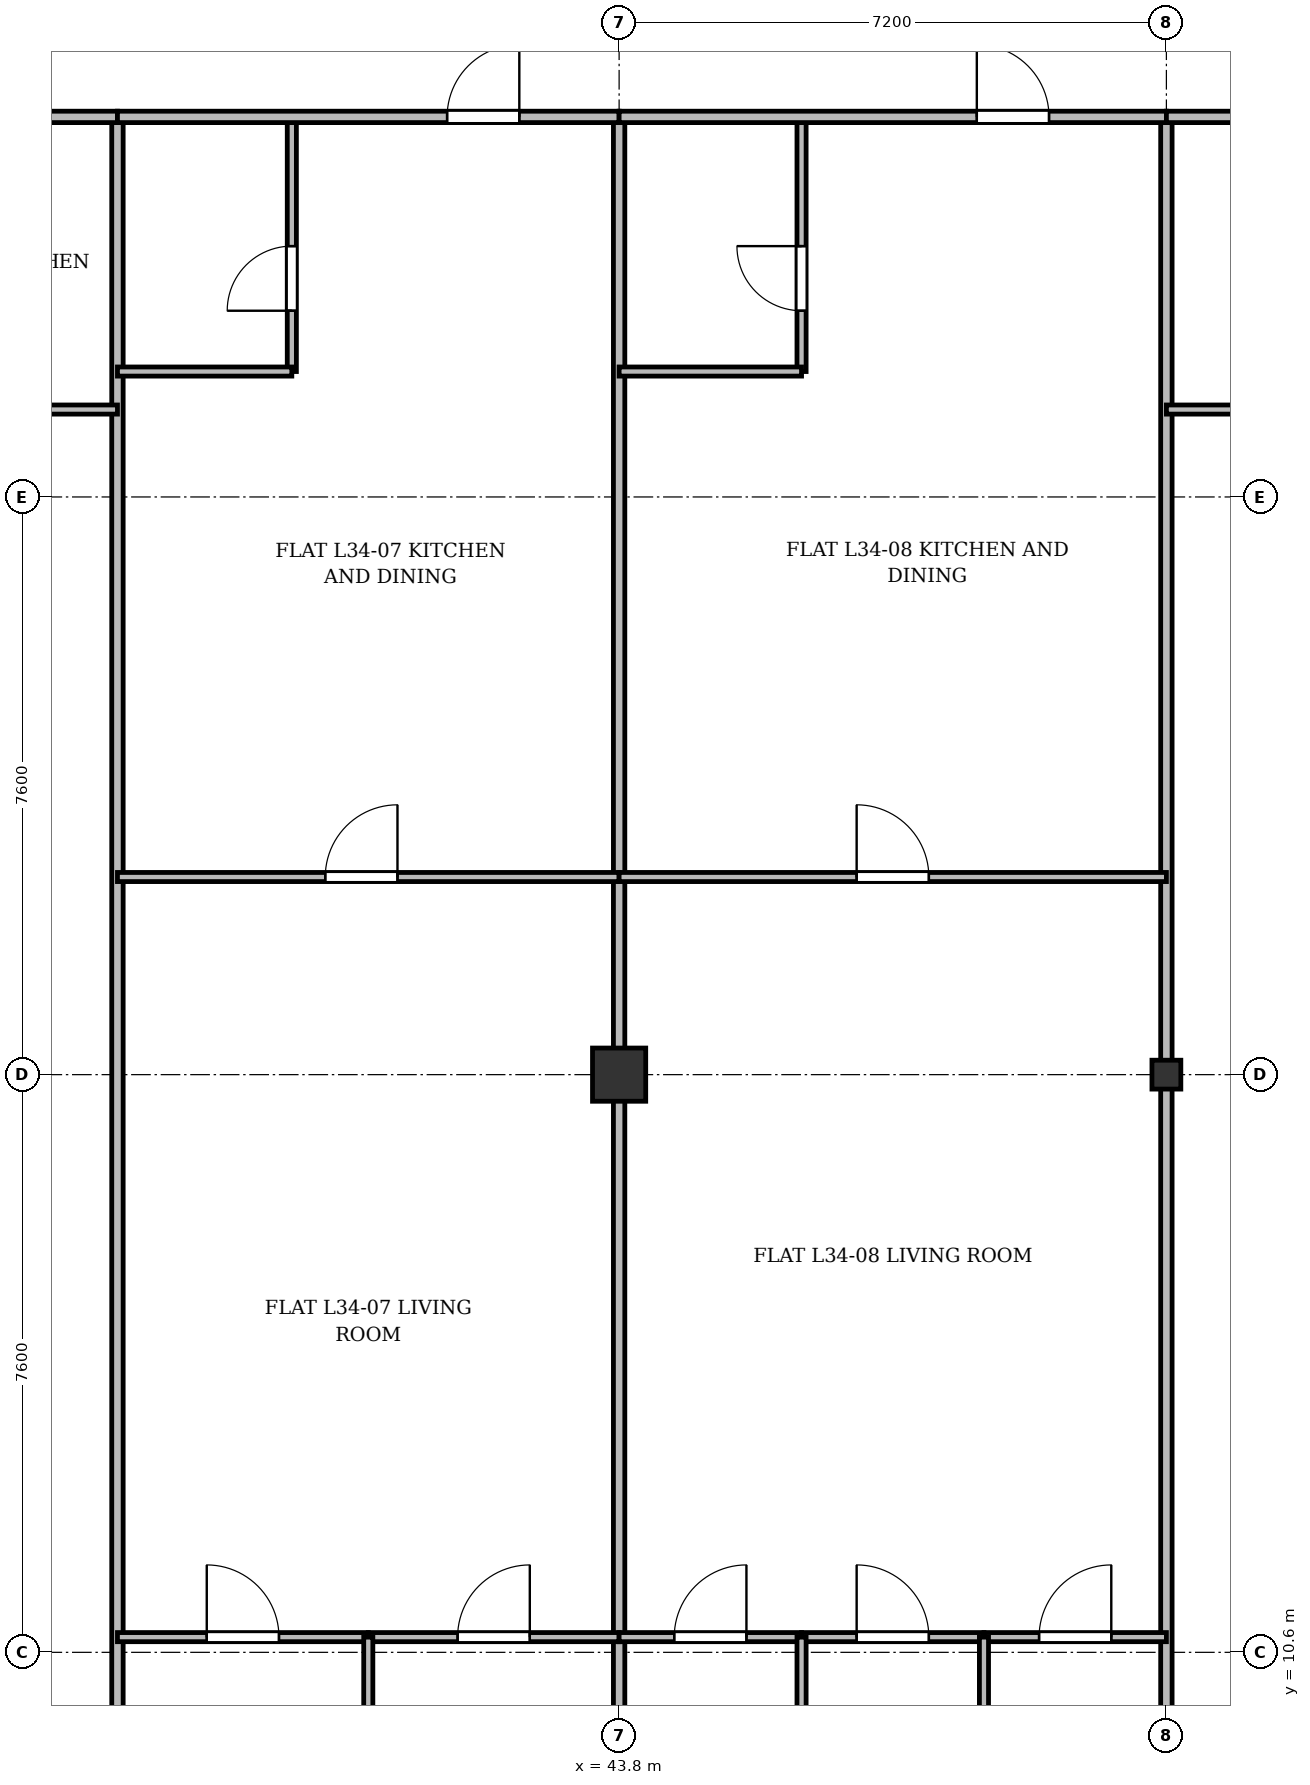
"""IFC4 building model, lengths in metres.
Left out: names, types, materials, properties, quantities, classifications, styles, units other than length and angle.
Written with IfcOpenShell. Run it as: python <this file> out.ifc"""

import sys

from ifc_helpers import new_model, si_unit, direction, frame, frame_2d, origin, origin_2d, place, context, subcontext, project, spatial, rectangle, i_section, extrude, source, transform, mapped, element, fill, save


model = new_model("IFC4")
c1 = context("Model", 3, precision=1e-05, world=origin(), true_north=direction((0.0, 1.0)))
c2 = subcontext(c1, "Body", "Model", "MODEL_VIEW")
j1 = project(units=[si_unit("LENGTHUNIT", "METRE"), si_unit("PLANEANGLEUNIT", "RADIAN")], contexts=[c1])
p1 = place(None, origin())
s1 = spatial("IfcSite", under=j1, at=p1, CompositionType="ELEMENT")
p2 = place(p1, origin())
s2 = spatial("IfcBuilding", under=s1, at=p2, CompositionType="ELEMENT")
p3 = place(p2, frame((0.0, 0.0, 132.1)))
s3 = spatial("IfcBuildingStorey", under=s2, at=p3, CompositionType="ELEMENT", Elevation=132.1)
m1 = source(origin(), c2, "Body", "SweptSolid", [
    extrude(rectangle(XDim=0.7, YDim=0.7, at=origin_2d()), origin(), (0.0, 0.0, 1.0), 3.6),
])
p4 = place(p3, frame((43.8, 18.2, 0.0), z_axis=(0.0, 0.0, 1.0), x_axis=(1.0, 0.0, 0.0)))
e1 = element("IfcColumn", 1, at=p4, inside=s3, PredefinedType="COLUMN", context=c2, shape_type="MappedRepresentation", body=[
    mapped(m1, transform((0.0, 0.0, 0.0), x_axis=(1.0, 0.0, 0.0), y_axis=(0.0, 1.0, 0.0), z_axis=(0.0, 0.0, 1.0), scale=1.0)),
])
m2 = source(origin(), c2, "Body", "SweptSolid", [
    extrude(i_section(OverallWidth=0.38, OverallDepth=0.38, WebThickness=0.02, FlangeThickness=0.03, at=origin_2d()), origin(), (0.0, 0.0, 1.0), 3.6),
])
p5 = place(p3, frame((51.0, 18.2, 0.0), z_axis=(0.0, 0.0, 1.0), x_axis=(1.0, 0.0, 0.0)))
e2 = element("IfcColumn", 2, at=p5, inside=s3, PredefinedType="COLUMN", context=c2, shape_type="MappedRepresentation", body=[
    mapped(m2, transform((0.0, 0.0, 0.0), x_axis=(1.0, 0.0, 0.0), y_axis=(0.0, 1.0, 0.0), z_axis=(0.0, 0.0, 1.0), scale=1.0)),
])
p6 = place(p3, frame((37.2, 3.525, 0.0), z_axis=(0.0, 0.0, 1.0), x_axis=(0.0, 1.0, 0.0)))
e3 = element("IfcWall", 3, at=p6, inside=s3, PredefinedType="PARTITIONING", context=c2, shape_type="SweptSolid", body=[
    extrude(rectangle(XDim=27.275, YDim=0.15, at=frame_2d((13.638, 0.0))), origin(), (0.0, 0.0, 1.0), 2.75),
])
for number, where, z_axis, x_axis in (
    (4, (43.8, 3.525, 0.0), (0.0, 0.0, 1.0), (0.0, 1.0, 0.0)),
    (5, (51.0, 3.525, 0.0), (0.0, 0.0, 1.0), (0.0, 1.0, 0.0)),
):
    element("IfcWall", number, at=place(p3, frame(where, z_axis=z_axis, x_axis=x_axis)), inside=s3, PredefinedType="PARTITIONING", context=c2, shape_type="SweptSolid", body=[
        extrude(rectangle(XDim=27.275, YDim=0.15, at=frame_2d((13.638, 0.0))), origin(), (0.0, 0.0, 1.0), 2.85),
    ])
p7 = place(p3, frame((30.6, 30.8, 0.0), z_axis=(0.0, 0.0, 1.0), x_axis=(1.0, 0.0, 0.0)))
e6 = element("IfcWall", 6, at=p7, inside=s3, PredefinedType="PARTITIONING", context=c2, shape_type="SweptSolid", body=[
    extrude(rectangle(XDim=6.6, YDim=0.15, at=frame_2d((3.3, 0.0))), origin(), (0.0, 0.0, 1.0), 2.85),
])
p8 = place(p7, frame((2.734, 0.0, 0.0)))
e7 = element("IfcOpeningElement", 7, at=p8, cuts=e6, PredefinedType="OPENING", context=c2, shape_type="SweptSolid", body=[
    extrude(rectangle(XDim=0.95, YDim=2.15, at=frame_2d((0.475, 1.075))), frame((0.0, 0.085, 0.0), z_axis=(0.0, -1.0, 0.0), x_axis=(1.0, 0.0, 0.0)), (0.0, 0.0, 1.0), 0.17),
])
p9 = place(p3, frame((30.6, 26.95, 0.0), z_axis=(0.0, 0.0, 1.0), x_axis=(1.0, 0.0, 0.0)))
e8 = element("IfcWall", 8, at=p9, inside=s3, PredefinedType="PARTITIONING", context=c2, shape_type="SweptSolid", body=[
    extrude(rectangle(XDim=6.6, YDim=0.12, at=frame_2d((3.3, 0.0))), origin(), (0.0, 0.0, 1.0), 2.85),
])
p10 = place(p9, frame((2.734, 0.0, 0.0)))
e9 = element("IfcOpeningElement", 9, at=p10, cuts=e8, PredefinedType="OPENING", context=c2, shape_type="SweptSolid", body=[
    extrude(rectangle(XDim=0.95, YDim=2.15, at=frame_2d((0.475, 1.075))), frame((0.0, 0.07, 0.0), z_axis=(0.0, -1.0, 0.0), x_axis=(1.0, 0.0, 0.0)), (0.0, 0.0, 1.0), 0.14),
])
p11 = place(p3, frame((37.2, 20.8, 0.0), z_axis=(0.0, 0.0, 1.0), x_axis=(1.0, 0.0, 0.0)))
e10 = element("IfcWall", 10, at=p11, inside=s3, PredefinedType="PARTITIONING", context=c2, shape_type="SweptSolid", body=[
    extrude(rectangle(XDim=6.6, YDim=0.12, at=frame_2d((3.3, 0.0))), origin(), (0.0, 0.0, 1.0), 2.85),
])
p12 = place(p11, frame((2.734, 0.0, 0.0)))
e11 = element("IfcOpeningElement", 11, at=p12, cuts=e10, PredefinedType="OPENING", context=c2, shape_type="SweptSolid", body=[
    extrude(rectangle(XDim=0.95, YDim=2.15, at=frame_2d((0.475, 1.075))), frame((0.0, 0.07, 0.0), z_axis=(0.0, -1.0, 0.0), x_axis=(1.0, 0.0, 0.0)), (0.0, 0.0, 1.0), 0.14),
])
p13 = place(p3, frame((39.494, 27.45, 0.0), z_axis=(0.0, 0.0, 1.0), x_axis=(0.0, 1.0, 0.0)))
e12 = element("IfcWall", 12, at=p13, inside=s3, PredefinedType="PARTITIONING", context=c2, shape_type="SweptSolid", body=[
    extrude(rectangle(XDim=3.35, YDim=0.12, at=frame_2d((1.675, 0.0))), origin(), (0.0, 0.0, 1.0), 3.35),
])
p14 = place(p13, frame((0.8, 0.0, 0.0)))
e13 = element("IfcOpeningElement", 13, at=p14, cuts=e12, PredefinedType="OPENING", context=c2, shape_type="SweptSolid", body=[
    extrude(rectangle(XDim=0.85, YDim=2.1, at=frame_2d((0.425, 1.05))), frame((0.0, 0.07, 0.0), z_axis=(0.0, -1.0, 0.0), x_axis=(1.0, 0.0, 0.0)), (0.0, 0.0, 1.0), 0.14),
])
p15 = place(p3, frame((37.2, 27.45, 0.0), z_axis=(0.0, 0.0, 1.0), x_axis=(1.0, 0.0, 0.0)))
e14 = element("IfcWall", 14, at=p15, inside=s3, PredefinedType="PARTITIONING", context=c2, shape_type="SweptSolid", body=[
    extrude(rectangle(XDim=2.294, YDim=0.12, at=frame_2d((1.147, 0.0))), origin(), (0.0, 0.0, 1.0), 3.35),
])
p16 = place(p3, frame((37.2, 30.8, 0.0), z_axis=(0.0, 0.0, 1.0), x_axis=(1.0, 0.0, 0.0)))
e15 = element("IfcWall", 15, at=p16, inside=s3, PredefinedType="PARTITIONING", context=c2, shape_type="SweptSolid", body=[
    extrude(rectangle(XDim=6.6, YDim=0.15, at=frame_2d((3.3, 0.0))), origin(), (0.0, 0.0, 1.0), 2.85),
])
p17 = place(p16, frame((4.337, 0.0, 0.0)))
e16 = element("IfcOpeningElement", 16, at=p17, cuts=e15, PredefinedType="OPENING", context=c2, shape_type="SweptSolid", body=[
    extrude(rectangle(XDim=0.95, YDim=2.15, at=frame_2d((0.475, 1.075))), frame((0.0, 0.085, 0.0), z_axis=(0.0, -1.0, 0.0), x_axis=(1.0, 0.0, 0.0)), (0.0, 0.0, 1.0), 0.17),
])
p18 = place(p3, frame((37.2, 10.8, 0.0), z_axis=(0.0, 0.0, 1.0), x_axis=(1.0, 0.0, 0.0)))
e17 = element("IfcWall", 17, at=p18, inside=s3, PredefinedType="PARTITIONING", context=c2, shape_type="SweptSolid", body=[
    extrude(rectangle(XDim=3.3, YDim=0.12, at=frame_2d((1.65, 0.0))), origin(), (0.0, 0.0, 1.0), 3.0),
])
p19 = place(p18, frame((1.175, 0.0, 0.0)))
e18 = element("IfcOpeningElement", 18, at=p19, cuts=e17, PredefinedType="OPENING", context=c2, shape_type="SweptSolid", body=[
    extrude(rectangle(XDim=0.95, YDim=2.15, at=frame_2d((0.475, 1.075))), frame((0.0, 0.07, 0.0), z_axis=(0.0, -1.0, 0.0), x_axis=(1.0, 0.0, 0.0)), (0.0, 0.0, 1.0), 0.14),
])
p20 = place(p3, frame((40.5, 10.8, 0.0), z_axis=(0.0, 0.0, 1.0), x_axis=(1.0, 0.0, 0.0)))
e19 = element("IfcWall", 19, at=p20, inside=s3, PredefinedType="PARTITIONING", context=c2, shape_type="SweptSolid", body=[
    extrude(rectangle(XDim=3.3, YDim=0.12, at=frame_2d((1.65, 0.0))), origin(), (0.0, 0.0, 1.0), 2.85),
])
p21 = place(p20, frame((1.175, 0.0, 0.0)))
e20 = element("IfcOpeningElement", 20, at=p21, cuts=e19, PredefinedType="OPENING", context=c2, shape_type="SweptSolid", body=[
    extrude(rectangle(XDim=0.95, YDim=2.15, at=frame_2d((0.475, 1.075))), frame((0.0, 0.07, 0.0), z_axis=(0.0, -1.0, 0.0), x_axis=(1.0, 0.0, 0.0)), (0.0, 0.0, 1.0), 0.14),
])
p22 = place(p3, frame((40.5, 3.525, 0.0), z_axis=(0.0, 0.0, 1.0), x_axis=(0.0, 1.0, 0.0)))
e21 = element("IfcWall", 21, at=p22, inside=s3, PredefinedType="PARTITIONING", context=c2, shape_type="SweptSolid", body=[
    extrude(rectangle(XDim=7.275, YDim=0.12, at=frame_2d((3.638, 0.0))), origin(), (0.0, 0.0, 1.0), 2.75),
])
p23 = place(p3, frame((43.8, 20.8, 0.0), z_axis=(0.0, 0.0, 1.0), x_axis=(1.0, 0.0, 0.0)))
e22 = element("IfcWall", 22, at=p23, inside=s3, PredefinedType="PARTITIONING", context=c2, shape_type="SweptSolid", body=[
    extrude(rectangle(XDim=7.2, YDim=0.12, at=frame_2d((3.6, 0.0))), origin(), (0.0, 0.0, 1.0), 2.85),
])
p24 = place(p23, frame((3.125, 0.0, 0.0)))
e23 = element("IfcOpeningElement", 23, at=p24, cuts=e22, PredefinedType="OPENING", context=c2, shape_type="SweptSolid", body=[
    extrude(rectangle(XDim=0.95, YDim=2.15, at=frame_2d((0.475, 1.075))), frame((0.0, 0.07, 0.0), z_axis=(0.0, -1.0, 0.0), x_axis=(1.0, 0.0, 0.0)), (0.0, 0.0, 1.0), 0.14),
])
p25 = place(p3, frame((46.2, 27.45, 0.0), z_axis=(0.0, 0.0, 1.0), x_axis=(0.0, 1.0, 0.0)))
e24 = element("IfcWall", 24, at=p25, inside=s3, PredefinedType="PARTITIONING", context=c2, shape_type="SweptSolid", body=[
    extrude(rectangle(XDim=3.35, YDim=0.12, at=frame_2d((1.675, 0.0))), origin(), (0.0, 0.0, 1.0), 3.35),
])
p26 = place(p25, frame((0.8, 0.0, 0.0)))
e25 = element("IfcOpeningElement", 25, at=p26, cuts=e24, PredefinedType="OPENING", context=c2, shape_type="SweptSolid", body=[
    extrude(rectangle(XDim=0.85, YDim=2.1, at=frame_2d((0.425, 1.05))), frame((0.0, 0.07, 0.0), z_axis=(0.0, -1.0, 0.0), x_axis=(1.0, 0.0, 0.0)), (0.0, 0.0, 1.0), 0.14),
])
p27 = place(p3, frame((43.8, 27.45, 0.0), z_axis=(0.0, 0.0, 1.0), x_axis=(1.0, 0.0, 0.0)))
e26 = element("IfcWall", 26, at=p27, inside=s3, PredefinedType="PARTITIONING", context=c2, shape_type="SweptSolid", body=[
    extrude(rectangle(XDim=2.4, YDim=0.12, at=frame_2d((1.2, 0.0))), origin(), (0.0, 0.0, 1.0), 2.85),
])
p28 = place(p3, frame((43.8, 30.8, 0.0), z_axis=(0.0, 0.0, 1.0), x_axis=(1.0, 0.0, 0.0)))
e27 = element("IfcWall", 27, at=p28, inside=s3, PredefinedType="PARTITIONING", context=c2, shape_type="SweptSolid", body=[
    extrude(rectangle(XDim=7.2, YDim=0.15, at=frame_2d((3.6, 0.0))), origin(), (0.0, 0.0, 1.0), 2.85),
])
p29 = place(p28, frame((4.706, 0.0, 0.0)))
e28 = element("IfcOpeningElement", 28, at=p29, cuts=e27, PredefinedType="OPENING", context=c2, shape_type="SweptSolid", body=[
    extrude(rectangle(XDim=0.95, YDim=2.15, at=frame_2d((0.475, 1.075))), frame((0.0, 0.085, 0.0), z_axis=(0.0, -1.0, 0.0), x_axis=(1.0, 0.0, 0.0)), (0.0, 0.0, 1.0), 0.17),
])
p30 = place(p3, frame((43.8, 10.8, 0.0), z_axis=(0.0, 0.0, 1.0), x_axis=(1.0, 0.0, 0.0)))
e29 = element("IfcWall", 29, at=p30, inside=s3, PredefinedType="PARTITIONING", context=c2, shape_type="SweptSolid", body=[
    extrude(rectangle(XDim=2.4, YDim=0.12, at=frame_2d((1.2, 0.0))), origin(), (0.0, 0.0, 1.0), 2.85),
])
p31 = place(p30, frame((0.725, 0.0, 0.0)))
e30 = element("IfcOpeningElement", 30, at=p31, cuts=e29, PredefinedType="OPENING", context=c2, shape_type="SweptSolid", body=[
    extrude(rectangle(XDim=0.95, YDim=2.15, at=frame_2d((0.475, 1.075))), frame((0.0, 0.07, 0.0), z_axis=(0.0, -1.0, 0.0), x_axis=(1.0, 0.0, 0.0)), (0.0, 0.0, 1.0), 0.14),
])
p32 = place(p3, frame((46.2, 10.8, 0.0), z_axis=(0.0, 0.0, 1.0), x_axis=(1.0, 0.0, 0.0)))
e31 = element("IfcWall", 31, at=p32, inside=s3, PredefinedType="PARTITIONING", context=c2, shape_type="SweptSolid", body=[
    extrude(rectangle(XDim=2.4, YDim=0.12, at=frame_2d((1.2, 0.0))), origin(), (0.0, 0.0, 1.0), 3.0),
])
p33 = place(p32, frame((0.725, 0.0, 0.0)))
e32 = element("IfcOpeningElement", 32, at=p33, cuts=e31, PredefinedType="OPENING", context=c2, shape_type="SweptSolid", body=[
    extrude(rectangle(XDim=0.95, YDim=2.15, at=frame_2d((0.475, 1.075))), frame((0.0, 0.07, 0.0), z_axis=(0.0, -1.0, 0.0), x_axis=(1.0, 0.0, 0.0)), (0.0, 0.0, 1.0), 0.14),
])
p34 = place(p3, frame((46.2, 3.525, 0.0), z_axis=(0.0, 0.0, 1.0), x_axis=(0.0, 1.0, 0.0)))
e33 = element("IfcWall", 33, at=p34, inside=s3, PredefinedType="PARTITIONING", context=c2, shape_type="SweptSolid", body=[
    extrude(rectangle(XDim=7.275, YDim=0.12, at=frame_2d((3.638, 0.0))), origin(), (0.0, 0.0, 1.0), 2.75),
])
p35 = place(p3, frame((48.6, 10.8, 0.0), z_axis=(0.0, 0.0, 1.0), x_axis=(1.0, 0.0, 0.0)))
e34 = element("IfcWall", 34, at=p35, inside=s3, PredefinedType="PARTITIONING", context=c2, shape_type="SweptSolid", body=[
    extrude(rectangle(XDim=2.4, YDim=0.12, at=frame_2d((1.2, 0.0))), origin(), (0.0, 0.0, 1.0), 2.85),
])
p36 = place(p35, frame((0.725, 0.0, 0.0)))
e35 = element("IfcOpeningElement", 35, at=p36, cuts=e34, PredefinedType="OPENING", context=c2, shape_type="SweptSolid", body=[
    extrude(rectangle(XDim=0.95, YDim=2.15, at=frame_2d((0.475, 1.075))), frame((0.0, 0.07, 0.0), z_axis=(0.0, -1.0, 0.0), x_axis=(1.0, 0.0, 0.0)), (0.0, 0.0, 1.0), 0.14),
])
p37 = place(p3, frame((48.6, 3.525, 0.0), z_axis=(0.0, 0.0, 1.0), x_axis=(0.0, 1.0, 0.0)))
e36 = element("IfcWall", 36, at=p37, inside=s3, PredefinedType="PARTITIONING", context=c2, shape_type="SweptSolid", body=[
    extrude(rectangle(XDim=7.275, YDim=0.12, at=frame_2d((3.638, 0.0))), origin(), (0.0, 0.0, 1.0), 2.75),
])
p38 = place(p3, frame((51.0, 30.8, 0.0), z_axis=(0.0, 0.0, 1.0), x_axis=(1.0, 0.0, 0.0)))
e37 = element("IfcWall", 37, at=p38, inside=s3, PredefinedType="PARTITIONING", context=c2, shape_type="SweptSolid", body=[
    extrude(rectangle(XDim=3.2, YDim=0.15, at=frame_2d((1.6, 0.0))), origin(), (0.0, 0.0, 1.0), 2.85),
])
p39 = place(p38, frame((1.125, 0.0, 0.0)))
e38 = element("IfcOpeningElement", 38, at=p39, cuts=e37, PredefinedType="OPENING", context=c2, shape_type="SweptSolid", body=[
    extrude(rectangle(XDim=0.95, YDim=2.15, at=frame_2d((0.475, 1.075))), frame((0.0, 0.085, 0.0), z_axis=(0.0, -1.0, 0.0), x_axis=(1.0, 0.0, 0.0)), (0.0, 0.0, 1.0), 0.17),
])
p40 = place(p3, frame((51.0, 26.95, 0.0), z_axis=(0.0, 0.0, 1.0), x_axis=(1.0, 0.0, 0.0)))
e39 = element("IfcWall", 39, at=p40, inside=s3, PredefinedType="PARTITIONING", context=c2, shape_type="SweptSolid", body=[
    extrude(rectangle(XDim=3.2, YDim=0.12, at=frame_2d((1.6, 0.0))), origin(), (0.0, 0.0, 1.0), 2.85),
])
p41 = place(p40, frame((1.125, 0.0, 0.0)))
e40 = element("IfcOpeningElement", 40, at=p41, cuts=e39, PredefinedType="OPENING", context=c2, shape_type="SweptSolid", body=[
    extrude(rectangle(XDim=0.95, YDim=2.15, at=frame_2d((0.475, 1.075))), frame((0.0, 0.07, 0.0), z_axis=(0.0, -1.0, 0.0), x_axis=(1.0, 0.0, 0.0)), (0.0, 0.0, 1.0), 0.14),
])
m3 = source(origin(), c2, "Body", "SweptSolid", [
    extrude(rectangle(XDim=0.95, YDim=2.15, at=frame_2d((0.475, 1.075))), frame((0.0, 0.025, 0.0), z_axis=(0.0, -1.0, 0.0), x_axis=(1.0, 0.0, 0.0)), (0.0, 0.0, 1.0), 0.05),
])
p42 = place(p12, origin())
e41 = element("IfcDoor", 41, at=p42, inside=s3, OperationType="SINGLE_SWING_RIGHT", PredefinedType="DOOR", context=c2, shape_type="MappedRepresentation", body=[
    mapped(m3, transform((0.0, 0.0, 0.0), x_axis=(1.0, 0.0, 0.0), y_axis=(0.0, 1.0, 0.0), z_axis=(0.0, 0.0, 1.0), scale=1.0)),
])
fill(e11, e41)
m4 = source(origin(), c2, "Body", "SweptSolid", [
    extrude(rectangle(XDim=0.85, YDim=2.1, at=frame_2d((0.425, 1.05))), frame((0.0, 0.025, 0.0), z_axis=(0.0, -1.0, 0.0), x_axis=(1.0, 0.0, 0.0)), (0.0, 0.0, 1.0), 0.05),
])
p43 = place(p14, origin())
e42 = element("IfcDoor", 42, at=p43, inside=s3, OperationType="SINGLE_SWING_LEFT", PredefinedType="DOOR", context=c2, shape_type="MappedRepresentation", body=[
    mapped(m4, transform((0.0, 0.0, 0.0), x_axis=(1.0, 0.0, 0.0), y_axis=(0.0, 1.0, 0.0), z_axis=(0.0, 0.0, 1.0), scale=1.0)),
])
fill(e13, e42)
p44 = place(p17, origin())
e43 = element("IfcDoor", 43, at=p44, inside=s3, OperationType="SINGLE_SWING_RIGHT", PredefinedType="DOOR", context=c2, shape_type="MappedRepresentation", body=[
    mapped(m3, transform((0.0, 0.0, 0.0), x_axis=(1.0, 0.0, 0.0), y_axis=(0.0, 1.0, 0.0), z_axis=(0.0, 0.0, 1.0), scale=1.0)),
])
fill(e16, e43)
p45 = place(p19, origin())
e44 = element("IfcDoor", 44, at=p45, inside=s3, OperationType="SINGLE_SWING_LEFT", PredefinedType="DOOR", context=c2, shape_type="MappedRepresentation", body=[
    mapped(m3, transform((0.0, 0.0, 0.0), x_axis=(1.0, 0.0, 0.0), y_axis=(0.0, 1.0, 0.0), z_axis=(0.0, 0.0, 1.0), scale=1.0)),
])
fill(e18, e44)
p46 = place(p21, origin())
e45 = element("IfcDoor", 45, at=p46, inside=s3, OperationType="SINGLE_SWING_RIGHT", PredefinedType="DOOR", context=c2, shape_type="MappedRepresentation", body=[
    mapped(m3, transform((0.0, 0.0, 0.0), x_axis=(1.0, 0.0, 0.0), y_axis=(0.0, 1.0, 0.0), z_axis=(0.0, 0.0, 1.0), scale=1.0)),
])
fill(e20, e45)
p47 = place(p24, origin())
e46 = element("IfcDoor", 46, at=p47, inside=s3, OperationType="SINGLE_SWING_LEFT", PredefinedType="DOOR", context=c2, shape_type="MappedRepresentation", body=[
    mapped(m3, transform((0.0, 0.0, 0.0), x_axis=(1.0, 0.0, 0.0), y_axis=(0.0, 1.0, 0.0), z_axis=(0.0, 0.0, 1.0), scale=1.0)),
])
fill(e23, e46)
p48 = place(p26, origin())
e47 = element("IfcDoor", 47, at=p48, inside=s3, OperationType="SINGLE_SWING_RIGHT", PredefinedType="DOOR", context=c2, shape_type="MappedRepresentation", body=[
    mapped(m4, transform((0.0, 0.0, 0.0), x_axis=(1.0, 0.0, 0.0), y_axis=(0.0, 1.0, 0.0), z_axis=(0.0, 0.0, 1.0), scale=1.0)),
])
fill(e25, e47)
p49 = place(p29, origin())
e48 = element("IfcDoor", 48, at=p49, inside=s3, OperationType="SINGLE_SWING_LEFT", PredefinedType="DOOR", context=c2, shape_type="MappedRepresentation", body=[
    mapped(m3, transform((0.0, 0.0, 0.0), x_axis=(1.0, 0.0, 0.0), y_axis=(0.0, 1.0, 0.0), z_axis=(0.0, 0.0, 1.0), scale=1.0)),
])
fill(e28, e48)
p50 = place(p31, origin())
e49 = element("IfcDoor", 49, at=p50, inside=s3, OperationType="SINGLE_SWING_RIGHT", PredefinedType="DOOR", context=c2, shape_type="MappedRepresentation", body=[
    mapped(m3, transform((0.0, 0.0, 0.0), x_axis=(1.0, 0.0, 0.0), y_axis=(0.0, 1.0, 0.0), z_axis=(0.0, 0.0, 1.0), scale=1.0)),
])
fill(e30, e49)
p51 = place(p33, origin())
e50 = element("IfcDoor", 50, at=p51, inside=s3, OperationType="SINGLE_SWING_LEFT", PredefinedType="DOOR", context=c2, shape_type="MappedRepresentation", body=[
    mapped(m3, transform((0.0, 0.0, 0.0), x_axis=(1.0, 0.0, 0.0), y_axis=(0.0, 1.0, 0.0), z_axis=(0.0, 0.0, 1.0), scale=1.0)),
])
fill(e32, e50)
p52 = place(p36, origin())
e51 = element("IfcDoor", 51, at=p52, inside=s3, OperationType="SINGLE_SWING_RIGHT", PredefinedType="DOOR", context=c2, shape_type="MappedRepresentation", body=[
    mapped(m3, transform((0.0, 0.0, 0.0), x_axis=(1.0, 0.0, 0.0), y_axis=(0.0, 1.0, 0.0), z_axis=(0.0, 0.0, 1.0), scale=1.0)),
])
fill(e35, e51)
save(model, sys.argv[1])
